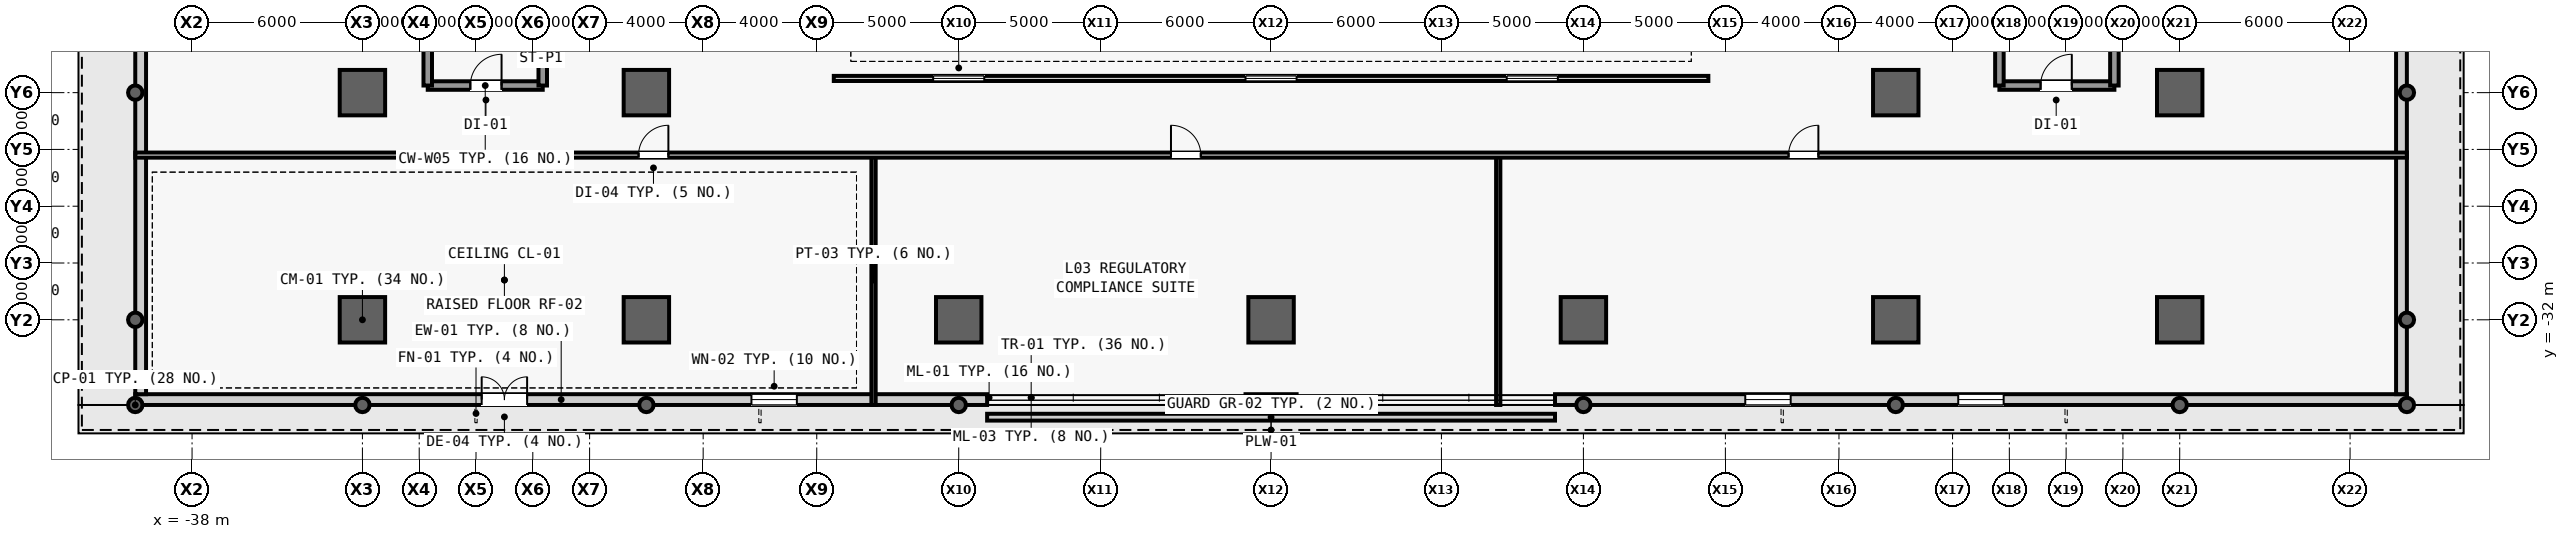
"""IFC4 building model, lengths in metres.
Left out: names, types, materials, properties, quantities, classifications, styles, units other than length and angle.
Written with IfcOpenShell. Run it as: python <this file> out.ifc"""

import sys

from ifc_helpers import new_model, si_unit, direction, frame, frame_2d, origin, origin_2d, place, context, subcontext, project, spatial, rectangle, hollow_circle, extrude, source, transform, mapped, element, fill, save


model = new_model("IFC4")
c1 = context("Model", 3, precision=1e-05, world=origin(), true_north=direction((0.0, 1.0)))
c2 = subcontext(c1, "Body", "Model", "MODEL_VIEW")
j1 = project(units=[si_unit("LENGTHUNIT", "METRE"), si_unit("PLANEANGLEUNIT", "RADIAN")], contexts=[c1])
p1 = place(None, origin())
s1 = spatial("IfcSite", under=j1, at=p1, CompositionType="ELEMENT")
p2 = place(p1, origin())
s2 = spatial("IfcBuilding", under=s1, at=p2, CompositionType="ELEMENT")
p3 = place(p2, frame((0.0, 0.0, 17.4)))
s3 = spatial("IfcBuildingStorey", under=s2, at=p3, CompositionType="ELEMENT", Elevation=17.4)
m1 = source(origin(), c2, "Body", "SweptSolid", [
    extrude(hollow_circle(Radius=0.254, WallThickness=0.025, at=origin_2d()), origin(), (0.0, 0.0, 1.0), 4.8),
])
for number, where, z_axis, x_axis in (
    (1, (-40.0, -35.0, 0.0), (0.0, 0.0, 1.0), (1.0, 0.0, 0.0)),
    (2, (-40.0, -24.0, 0.0), (0.0, 0.0, 1.0), (1.0, 0.0, 0.0)),
    (3, (-32.0, -35.0, 0.0), (0.0, 0.0, 1.0), (1.0, 0.0, 0.0)),
):
    element("IfcColumn", number, at=place(p3, frame(where, z_axis=z_axis, x_axis=x_axis)), inside=s3, PredefinedType="COLUMN", context=c2, shape_type="MappedRepresentation", body=[
        mapped(m1, transform((0.0, 0.0, 0.0), scale=1.0)),
    ])
m2 = source(origin(), c2, "Body", "SweptSolid", [
    extrude(rectangle(XDim=1.6, YDim=1.6, at=origin_2d()), origin(), (0.0, 0.0, 1.0), 4.8),
])
for number, where, z_axis, x_axis in (
    (4, (-32.0, -32.0, 0.0), (0.0, 0.0, 1.0), (1.0, 0.0, 0.0)),
    (5, (-32.0, -24.0, 0.0), (0.0, 0.0, 1.0), (1.0, 0.0, 0.0)),
):
    element("IfcColumn", number, at=place(p3, frame(where, z_axis=z_axis, x_axis=x_axis)), inside=s3, PredefinedType="COLUMN", context=c2, shape_type="MappedRepresentation", body=[
        mapped(m2, transform((0.0, 0.0, 0.0), scale=1.0)),
    ])
p4 = place(p3, frame((-22.0, -35.0, 0.0), z_axis=(0.0, 0.0, 1.0), x_axis=(1.0, 0.0, 0.0)))
e6 = element("IfcColumn", 6, at=p4, inside=s3, PredefinedType="COLUMN", context=c2, shape_type="MappedRepresentation", body=[
    mapped(m1, transform((0.0, 0.0, 0.0), scale=1.0)),
])
for number, where, z_axis, x_axis in (
    (7, (-22.0, -32.0, 0.0), (0.0, 0.0, 1.0), (1.0, 0.0, 0.0)),
    (8, (-22.0, -24.0, 0.0), (0.0, 0.0, 1.0), (1.0, 0.0, 0.0)),
):
    element("IfcColumn", number, at=place(p3, frame(where, z_axis=z_axis, x_axis=x_axis)), inside=s3, PredefinedType="COLUMN", context=c2, shape_type="MappedRepresentation", body=[
        mapped(m2, transform((0.0, 0.0, 0.0), scale=1.0)),
    ])
p5 = place(p3, frame((-11.0, -35.0, 0.0), z_axis=(0.0, 0.0, 1.0), x_axis=(1.0, 0.0, 0.0)))
e9 = element("IfcColumn", 9, at=p5, inside=s3, PredefinedType="COLUMN", context=c2, shape_type="MappedRepresentation", body=[
    mapped(m1, transform((0.0, 0.0, 0.0), scale=1.0)),
])
for number, where, z_axis, x_axis in (
    (10, (-11.0, -32.0, 0.0), (0.0, 0.0, 1.0), (1.0, 0.0, 0.0)),
    (11, (0.0, -32.0, 0.0), (0.0, 0.0, 1.0), (1.0, 0.0, 0.0)),
):
    element("IfcColumn", number, at=place(p3, frame(where, z_axis=z_axis, x_axis=x_axis)), inside=s3, PredefinedType="COLUMN", context=c2, shape_type="MappedRepresentation", body=[
        mapped(m2, transform((0.0, 0.0, 0.0), scale=1.0)),
    ])
p6 = place(p3, frame((11.0, -35.0, 0.0), z_axis=(0.0, 0.0, 1.0), x_axis=(1.0, 0.0, 0.0)))
e12 = element("IfcColumn", 12, at=p6, inside=s3, PredefinedType="COLUMN", context=c2, shape_type="MappedRepresentation", body=[
    mapped(m1, transform((0.0, 0.0, 0.0), scale=1.0)),
])
p7 = place(p3, frame((11.0, -32.0, 0.0), z_axis=(0.0, 0.0, 1.0), x_axis=(1.0, 0.0, 0.0)))
e13 = element("IfcColumn", 13, at=p7, inside=s3, PredefinedType="COLUMN", context=c2, shape_type="MappedRepresentation", body=[
    mapped(m2, transform((0.0, 0.0, 0.0), scale=1.0)),
])
p8 = place(p3, frame((22.0, -35.0, 0.0), z_axis=(0.0, 0.0, 1.0), x_axis=(1.0, 0.0, 0.0)))
e14 = element("IfcColumn", 14, at=p8, inside=s3, PredefinedType="COLUMN", context=c2, shape_type="MappedRepresentation", body=[
    mapped(m1, transform((0.0, 0.0, 0.0), scale=1.0)),
])
for number, where, z_axis, x_axis in (
    (15, (22.0, -32.0, 0.0), (0.0, 0.0, 1.0), (1.0, 0.0, 0.0)),
    (16, (22.0, -24.0, 0.0), (0.0, 0.0, 1.0), (1.0, 0.0, 0.0)),
):
    element("IfcColumn", number, at=place(p3, frame(where, z_axis=z_axis, x_axis=x_axis)), inside=s3, PredefinedType="COLUMN", context=c2, shape_type="MappedRepresentation", body=[
        mapped(m2, transform((0.0, 0.0, 0.0), scale=1.0)),
    ])
p9 = place(p3, frame((32.0, -35.0, 0.0), z_axis=(0.0, 0.0, 1.0), x_axis=(1.0, 0.0, 0.0)))
e17 = element("IfcColumn", 17, at=p9, inside=s3, PredefinedType="COLUMN", context=c2, shape_type="MappedRepresentation", body=[
    mapped(m1, transform((0.0, 0.0, 0.0), scale=1.0)),
])
for number, where, z_axis, x_axis in (
    (18, (32.0, -32.0, 0.0), (0.0, 0.0, 1.0), (1.0, 0.0, 0.0)),
    (19, (32.0, -24.0, 0.0), (0.0, 0.0, 1.0), (1.0, 0.0, 0.0)),
):
    element("IfcColumn", number, at=place(p3, frame(where, z_axis=z_axis, x_axis=x_axis)), inside=s3, PredefinedType="COLUMN", context=c2, shape_type="MappedRepresentation", body=[
        mapped(m2, transform((0.0, 0.0, 0.0), scale=1.0)),
    ])
for number, where, z_axis, x_axis in (
    (20, (40.0, -35.0, 0.0), (0.0, 0.0, 1.0), (1.0, 0.0, 0.0)),
    (21, (40.0, -24.0, 0.0), (0.0, 0.0, 1.0), (1.0, 0.0, 0.0)),
    (22, (-40.0, -32.0, 0.0), (0.0, 0.0, 1.0), (1.0, 0.0, 0.0)),
    (23, (40.0, -32.0, 0.0), (0.0, 0.0, 1.0), (1.0, 0.0, 0.0)),
):
    element("IfcColumn", number, at=place(p3, frame(where, z_axis=z_axis, x_axis=x_axis)), inside=s3, PredefinedType="COLUMN", context=c2, shape_type="MappedRepresentation", body=[
        mapped(m1, transform((0.0, 0.0, 0.0), scale=1.0)),
    ])
m3 = source(origin(), c2, "Body", "SweptSolid", [
    extrude(rectangle(XDim=30.0, YDim=0.38, at=frame_2d((15.0, 0.0))), origin(), (0.0, 0.0, 1.0), 2.68),
])
p10 = place(p3, frame((-40.0, -34.81, 0.0), z_axis=(0.0, 0.0, 1.0), x_axis=(1.0, 0.0, 0.0)))
e24 = element("IfcWall", 24, at=p10, inside=s3, PredefinedType="STANDARD", context=c2, shape_type="MappedRepresentation", body=[
    mapped(m3, transform((0.0, 0.0, 0.0), scale=1.0)),
])
m4 = source(origin(), c2, "Body", "SweptSolid", [
    extrude(rectangle(XDim=1.6, YDim=2.25, at=frame_2d((0.8, 1.125))), frame((0.0, 0.2, 0.0), z_axis=(0.0, -1.0, 0.0), x_axis=(1.0, 0.0, 0.0)), (0.0, 0.0, 1.0), 0.4),
])
p11 = place(p10, frame((12.2, 0.0, 0.0)))
e25 = element("IfcOpeningElement", 25, at=p11, cuts=e24, PredefinedType="OPENING", context=c2, shape_type="MappedRepresentation", body=[
    mapped(m4, transform((0.0, 0.0, 0.0), scale=1.0)),
])
m5 = source(origin(), c2, "Body", "SweptSolid", [
    extrude(rectangle(XDim=1.6, YDim=1.96, at=frame_2d((0.8, 0.98))), frame((0.0, 0.2, 0.0), z_axis=(0.0, -1.0, 0.0), x_axis=(1.0, 0.0, 0.0)), (0.0, 0.0, 1.0), 0.4),
])
p12 = place(p10, frame((21.7, 0.0, 0.5)))
e26 = element("IfcOpeningElement", 26, at=p12, cuts=e24, PredefinedType="OPENING", context=c2, shape_type="MappedRepresentation", body=[
    mapped(m5, transform((0.0, 0.0, 0.0), scale=1.0)),
])
m6 = source(origin(), c2, "Body", "SweptSolid", [
    extrude(rectangle(XDim=1.8, YDim=0.38, at=frame_2d((0.9, 0.0))), origin(), (0.0, 0.0, 1.0), 2.68),
])
p13 = place(p3, frame((-0.9, -34.81, 0.0), z_axis=(0.0, 0.0, 1.0), x_axis=(1.0, 0.0, 0.0)))
e27 = element("IfcWall", 27, at=p13, inside=s3, PredefinedType="STANDARD", context=c2, shape_type="MappedRepresentation", body=[
    mapped(m6, transform((0.0, 0.0, 0.0), scale=1.0)),
])
p14 = place(p3, frame((10.0, -34.81, 0.0), z_axis=(0.0, 0.0, 1.0), x_axis=(1.0, 0.0, 0.0)))
e28 = element("IfcWall", 28, at=p14, inside=s3, PredefinedType="STANDARD", context=c2, shape_type="MappedRepresentation", body=[
    mapped(m3, transform((0.0, 0.0, 0.0), scale=1.0)),
])
p15 = place(p14, frame((6.7, 0.0, 0.5)))
e29 = element("IfcOpeningElement", 29, at=p15, cuts=e28, PredefinedType="OPENING", context=c2, shape_type="MappedRepresentation", body=[
    mapped(m5, transform((0.0, 0.0, 0.0), scale=1.0)),
])
p16 = place(p14, frame((14.2, 0.0, 0.5)))
e30 = element("IfcOpeningElement", 30, at=p16, cuts=e28, PredefinedType="OPENING", context=c2, shape_type="MappedRepresentation", body=[
    mapped(m5, transform((0.0, 0.0, 0.0), scale=1.0)),
])
m7 = source(origin(), c2, "Body", "SweptSolid", [
    extrude(rectangle(XDim=69.24, YDim=0.38, at=frame_2d((34.62, 0.0))), origin(), (0.0, 0.0, 1.0), 2.68),
])
p17 = place(p3, frame((-39.81, -34.62, 0.0), z_axis=(0.0, 0.0, 1.0), x_axis=(0.0, 1.0, 0.0)))
e31 = element("IfcWall", 31, at=p17, inside=s3, PredefinedType="STANDARD", context=c2, shape_type="MappedRepresentation", body=[
    mapped(m7, transform((0.0, 0.0, 0.0), scale=1.0)),
])
p18 = place(p17, frame((39.82, 0.0, 0.0)))
e32 = element("IfcOpeningElement", 32, at=p18, cuts=e31, PredefinedType="OPENING", context=c2, shape_type="MappedRepresentation", body=[
    mapped(m4, transform((0.0, 0.0, 0.0), scale=1.0)),
])
p19 = place(p17, frame((16.51, 0.0, 0.5)))
e33 = element("IfcOpeningElement", 33, at=p19, cuts=e31, PredefinedType="OPENING", context=c2, shape_type="MappedRepresentation", body=[
    mapped(m5, transform((0.0, 0.0, 0.0), scale=1.0)),
])
p20 = place(p17, frame((51.13, 0.0, 0.5)))
e34 = element("IfcOpeningElement", 34, at=p20, cuts=e31, PredefinedType="OPENING", context=c2, shape_type="MappedRepresentation", body=[
    mapped(m5, transform((0.0, 0.0, 0.0), scale=1.0)),
])
p21 = place(p3, frame((39.81, -34.62, 0.0), z_axis=(0.0, 0.0, 1.0), x_axis=(0.0, 1.0, 0.0)))
e35 = element("IfcWall", 35, at=p21, inside=s3, PredefinedType="STANDARD", context=c2, shape_type="MappedRepresentation", body=[
    mapped(m7, transform((0.0, 0.0, 0.0), scale=1.0)),
])
p22 = place(p21, frame((39.82, 0.0, 0.0)))
e36 = element("IfcOpeningElement", 36, at=p22, cuts=e35, PredefinedType="OPENING", context=c2, shape_type="MappedRepresentation", body=[
    mapped(m4, transform((0.0, 0.0, 0.0), scale=1.0)),
])
p23 = place(p21, frame((16.51, 0.0, 0.5)))
e37 = element("IfcOpeningElement", 37, at=p23, cuts=e35, PredefinedType="OPENING", context=c2, shape_type="MappedRepresentation", body=[
    mapped(m5, transform((0.0, 0.0, 0.0), scale=1.0)),
])
p24 = place(p21, frame((51.13, 0.0, 0.5)))
e38 = element("IfcOpeningElement", 38, at=p24, cuts=e35, PredefinedType="OPENING", context=c2, shape_type="MappedRepresentation", body=[
    mapped(m5, transform((0.0, 0.0, 0.0), scale=1.0)),
])
m8 = source(origin(), c2, "Body", "SweptSolid", [
    extrude(rectangle(XDim=20.0, YDim=0.24, at=frame_2d((10.0, 0.0))), origin(), (0.0, 0.0, 1.0), 0.65),
])
p25 = place(p3, frame((-10.0, -35.43, 0.0), z_axis=(0.0, 0.0, 1.0), x_axis=(1.0, 0.0, 0.0)))
e39 = element("IfcWall", 39, at=p25, inside=s3, PredefinedType="STANDARD", context=c2, shape_type="MappedRepresentation", body=[
    mapped(m8, transform((0.0, 0.0, 0.0), scale=1.0)),
])
m9 = source(origin(), c2, "Body", "SweptSolid", [
    extrude(rectangle(XDim=4.05, YDim=0.3, at=frame_2d((2.025, 0.0))), origin(), (0.0, 0.0, 1.0), 4.48),
])
p26 = place(p3, frame((-29.7, -23.75, 0.0), z_axis=(0.0, 0.0, 1.0), x_axis=(1.0, 0.0, 0.0)))
e40 = element("IfcWall", 40, at=p26, inside=s3, PredefinedType="SHEAR", context=c2, shape_type="MappedRepresentation", body=[
    mapped(m9, transform((0.0, 0.0, 0.0), scale=1.0)),
])
m10 = source(origin(), c2, "Body", "SweptSolid", [
    extrude(rectangle(XDim=1.1, YDim=2.2, at=frame_2d((0.55, 1.1))), frame((0.0, 0.16, 0.0), z_axis=(0.0, -1.0, 0.0), x_axis=(1.0, 0.0, 0.0)), (0.0, 0.0, 1.0), 0.32),
])
p27 = place(p26, frame((1.5, 0.0, 0.0)))
e41 = element("IfcOpeningElement", 41, at=p27, cuts=e40, PredefinedType="OPENING", context=c2, shape_type="MappedRepresentation", body=[
    mapped(m10, transform((0.0, 0.0, 0.0), scale=1.0)),
])
m11 = source(origin(), c2, "Body", "SweptSolid", [
    extrude(rectangle(XDim=10.5, YDim=0.3, at=frame_2d((5.25, 0.0))), origin(), (0.0, 0.0, 1.0), 4.48),
])
for number, where, z_axis, x_axis in (
    (42, (-29.7, -23.75, 0.0), (0.0, 0.0, 1.0), (0.0, 1.0, 0.0)),
    (43, (-25.65, -23.75, 0.0), (0.0, 0.0, 1.0), (0.0, 1.0, 0.0)),
):
    element("IfcWall", number, at=place(p3, frame(where, z_axis=z_axis, x_axis=x_axis)), inside=s3, PredefinedType="SHEAR", context=c2, shape_type="MappedRepresentation", body=[
        mapped(m11, transform((0.0, 0.0, 0.0), scale=1.0)),
    ])
p28 = place(p3, frame((25.65, -23.75, 0.0), z_axis=(0.0, 0.0, 1.0), x_axis=(1.0, 0.0, 0.0)))
e44 = element("IfcWall", 44, at=p28, inside=s3, PredefinedType="SHEAR", context=c2, shape_type="MappedRepresentation", body=[
    mapped(m9, transform((0.0, 0.0, 0.0), scale=1.0)),
])
p29 = place(p28, frame((1.45, 0.0, 0.0)))
e45 = element("IfcOpeningElement", 45, at=p29, cuts=e44, PredefinedType="OPENING", context=c2, shape_type="MappedRepresentation", body=[
    mapped(m10, transform((0.0, 0.0, 0.0), scale=1.0)),
])
for number, where, z_axis, x_axis in (
    (46, (25.65, -23.75, 0.0), (0.0, 0.0, 1.0), (0.0, 1.0, 0.0)),
    (47, (29.7, -23.75, 0.0), (0.0, 0.0, 1.0), (0.0, 1.0, 0.0)),
):
    element("IfcWall", number, at=place(p3, frame(where, z_axis=z_axis, x_axis=x_axis)), inside=s3, PredefinedType="SHEAR", context=c2, shape_type="MappedRepresentation", body=[
        mapped(m11, transform((0.0, 0.0, 0.0), scale=1.0)),
    ])
m12 = source(origin(), c2, "Body", "SweptSolid", [
    extrude(rectangle(XDim=30.8, YDim=0.18, at=frame_2d((15.4, 0.0))), origin(), (0.0, 0.0, 1.0), 4.48),
])
p30 = place(p3, frame((-15.4, -23.5, 0.0), z_axis=(0.0, 0.0, 1.0), x_axis=(1.0, 0.0, 0.0)))
e48 = element("IfcWall", 48, at=p30, inside=s3, PredefinedType="PARTITIONING", context=c2, shape_type="MappedRepresentation", body=[
    mapped(m12, transform((0.0, 0.0, 0.0), scale=1.0)),
])
m13 = source(origin(), c2, "Body", "SweptSolid", [
    extrude(rectangle(XDim=1.8, YDim=1.4, at=frame_2d((0.9, 0.7))), frame((0.0, 0.1, 0.0), z_axis=(0.0, -1.0, 0.0), x_axis=(1.0, 0.0, 0.0)), (0.0, 0.0, 1.0), 0.2),
])
p31 = place(p30, frame((3.5, 0.0, 0.9)))
e49 = element("IfcOpeningElement", 49, at=p31, cuts=e48, PredefinedType="OPENING", context=c2, shape_type="MappedRepresentation", body=[
    mapped(m13, transform((0.0, 0.0, 0.0), scale=1.0)),
])
p32 = place(p30, frame((14.5, 0.0, 0.9)))
e50 = element("IfcOpeningElement", 50, at=p32, cuts=e48, PredefinedType="OPENING", context=c2, shape_type="MappedRepresentation", body=[
    mapped(m13, transform((0.0, 0.0, 0.0), scale=1.0)),
])
p33 = place(p30, frame((23.7, 0.0, 0.9)))
e51 = element("IfcOpeningElement", 51, at=p33, cuts=e48, PredefinedType="OPENING", context=c2, shape_type="MappedRepresentation", body=[
    mapped(m13, transform((0.0, 0.0, 0.0), scale=1.0)),
])
m14 = source(origin(), c2, "Body", "SweptSolid", [
    extrude(rectangle(XDim=8.8, YDim=0.15, at=frame_2d((4.4, 0.0))), origin(), (0.0, 0.0, 1.0), 4.48),
])
for number, where, z_axis, x_axis in (
    (52, (-14.0, -35.0, 0.0), (0.0, 0.0, 1.0), (0.0, 1.0, 0.0)),
    (53, (8.0, -35.0, 0.0), (0.0, 0.0, 1.0), (0.0, 1.0, 0.0)),
):
    element("IfcWall", number, at=place(p3, frame(where, z_axis=z_axis, x_axis=x_axis)), inside=s3, PredefinedType="PARTITIONING", context=c2, shape_type="MappedRepresentation", body=[
        mapped(m14, transform((0.0, 0.0, 0.0), scale=1.0)),
    ])
m15 = source(origin(), c2, "Body", "SweptSolid", [
    extrude(rectangle(XDim=80.0, YDim=0.18, at=frame_2d((40.0, 0.0))), origin(), (0.0, 0.0, 1.0), 4.48),
])
p34 = place(p3, frame((-40.0, -26.2, 0.0), z_axis=(0.0, 0.0, 1.0), x_axis=(1.0, 0.0, 0.0)))
e54 = element("IfcWall", 54, at=p34, inside=s3, PredefinedType="PARTITIONING", context=c2, shape_type="MappedRepresentation", body=[
    mapped(m15, transform((0.0, 0.0, 0.0), scale=1.0)),
])
m16 = source(origin(), c2, "Body", "SweptSolid", [
    extrude(rectangle(XDim=1.05, YDim=2.2, at=frame_2d((0.525, 1.1))), frame((0.0, 0.1, 0.0), z_axis=(0.0, -1.0, 0.0), x_axis=(1.0, 0.0, 0.0)), (0.0, 0.0, 1.0), 0.2),
])
p35 = place(p34, frame((17.725, 0.0, 0.0)))
e55 = element("IfcOpeningElement", 55, at=p35, cuts=e54, PredefinedType="OPENING", context=c2, shape_type="MappedRepresentation", body=[
    mapped(m16, transform((0.0, 0.0, 0.0), scale=1.0)),
])
p36 = place(p34, frame((36.475, 0.0, 0.0)))
e56 = element("IfcOpeningElement", 56, at=p36, cuts=e54, PredefinedType="OPENING", context=c2, shape_type="MappedRepresentation", body=[
    mapped(m16, transform((0.0, 0.0, 0.0), scale=1.0)),
])
p37 = place(p34, frame((58.225, 0.0, 0.0)))
e57 = element("IfcOpeningElement", 57, at=p37, cuts=e54, PredefinedType="OPENING", context=c2, shape_type="MappedRepresentation", body=[
    mapped(m16, transform((0.0, 0.0, 0.0), scale=1.0)),
])
m17 = source(origin(), c2, "Body", "SweptSolid", [
    extrude(rectangle(XDim=1.6, YDim=2.25, at=frame_2d((0.8, 1.125))), frame((0.0, 0.025, 0.0), z_axis=(0.0, -1.0, 0.0), x_axis=(1.0, 0.0, 0.0)), (0.0, 0.0, 1.0), 0.05),
])
p38 = place(p11, origin())
e58 = element("IfcDoor", 58, at=p38, inside=s3, OperationType="DOUBLE_DOOR_SINGLE_SWING", PredefinedType="DOOR", context=c2, shape_type="MappedRepresentation", body=[
    mapped(m17, transform((0.0, 0.0, 0.0), scale=1.0)),
])
fill(e25, e58)
m18 = source(origin(), c2, "Body", "SweptSolid", [
    extrude(rectangle(XDim=1.6, YDim=1.96, at=frame_2d((0.8, 0.98))), frame((0.0, 0.03, 0.0), z_axis=(0.0, -1.0, 0.0), x_axis=(1.0, 0.0, 0.0)), (0.0, 0.0, 1.0), 0.06),
])
p39 = place(p12, origin())
e59 = element("IfcWindow", 59, at=p39, inside=s3, PartitioningType="SINGLE_PANEL", PredefinedType="WINDOW", context=c2, shape_type="MappedRepresentation", body=[
    mapped(m18, transform((0.0, 0.0, 0.0), scale=1.0)),
])
fill(e26, e59)
p40 = place(p15, origin())
e60 = element("IfcWindow", 60, at=p40, inside=s3, PartitioningType="SINGLE_PANEL", PredefinedType="WINDOW", context=c2, shape_type="MappedRepresentation", body=[
    mapped(m18, transform((0.0, 0.0, 0.0), scale=1.0)),
])
fill(e29, e60)
p41 = place(p16, origin())
e61 = element("IfcWindow", 61, at=p41, inside=s3, PartitioningType="SINGLE_PANEL", PredefinedType="WINDOW", context=c2, shape_type="MappedRepresentation", body=[
    mapped(m18, transform((0.0, 0.0, 0.0), scale=1.0)),
])
fill(e30, e61)
m19 = source(origin(), c2, "Body", "SweptSolid", [
    extrude(rectangle(XDim=1.1, YDim=2.2, at=frame_2d((0.55, 1.1))), frame((0.0, 0.025, 0.0), z_axis=(0.0, -1.0, 0.0), x_axis=(1.0, 0.0, 0.0)), (0.0, 0.0, 1.0), 0.05),
])
p42 = place(p27, origin())
e62 = element("IfcDoor", 62, at=p42, inside=s3, OperationType="SINGLE_SWING_RIGHT", PredefinedType="DOOR", context=c2, shape_type="MappedRepresentation", body=[
    mapped(m19, transform((0.0, 0.0, 0.0), scale=1.0)),
])
fill(e41, e62)
p43 = place(p29, origin())
e63 = element("IfcDoor", 63, at=p43, inside=s3, OperationType="SINGLE_SWING_RIGHT", PredefinedType="DOOR", context=c2, shape_type="MappedRepresentation", body=[
    mapped(m19, transform((0.0, 0.0, 0.0), scale=1.0)),
])
fill(e45, e63)
m20 = source(origin(), c2, "Body", "SweptSolid", [
    extrude(rectangle(XDim=1.05, YDim=2.2, at=frame_2d((0.525, 1.1))), frame((0.0, 0.025, 0.0), z_axis=(0.0, -1.0, 0.0), x_axis=(1.0, 0.0, 0.0)), (0.0, 0.0, 1.0), 0.05),
])
p44 = place(p35, origin())
e64 = element("IfcDoor", 64, at=p44, inside=s3, OperationType="SINGLE_SWING_RIGHT", PredefinedType="DOOR", context=c2, shape_type="MappedRepresentation", body=[
    mapped(m20, transform((0.0, 0.0, 0.0), scale=1.0)),
])
fill(e55, e64)
p45 = place(p36, origin())
e65 = element("IfcDoor", 65, at=p45, inside=s3, OperationType="SINGLE_SWING_LEFT", PredefinedType="DOOR", context=c2, shape_type="MappedRepresentation", body=[
    mapped(m20, transform((0.0, 0.0, 0.0), scale=1.0)),
])
fill(e56, e65)
p46 = place(p37, origin())
e66 = element("IfcDoor", 66, at=p46, inside=s3, OperationType="SINGLE_SWING_RIGHT", PredefinedType="DOOR", context=c2, shape_type="MappedRepresentation", body=[
    mapped(m20, transform((0.0, 0.0, 0.0), scale=1.0)),
])
fill(e57, e66)
m21 = source(origin(), c2, "Body", "SweptSolid", [
    extrude(rectangle(XDim=1.8, YDim=1.4, at=frame_2d((0.9, 0.7))), frame((0.0, 0.03, 0.0), z_axis=(0.0, -1.0, 0.0), x_axis=(1.0, 0.0, 0.0)), (0.0, 0.0, 1.0), 0.06),
])
p47 = place(p31, origin())
e67 = element("IfcWindow", 67, at=p47, inside=s3, PartitioningType="SINGLE_PANEL", PredefinedType="WINDOW", context=c2, shape_type="MappedRepresentation", body=[
    mapped(m21, transform((0.0, 0.0, 0.0), scale=1.0)),
])
fill(e49, e67)
p48 = place(p32, origin())
e68 = element("IfcWindow", 68, at=p48, inside=s3, PartitioningType="SINGLE_PANEL", PredefinedType="WINDOW", context=c2, shape_type="MappedRepresentation", body=[
    mapped(m21, transform((0.0, 0.0, 0.0), scale=1.0)),
])
fill(e50, e68)
p49 = place(p33, origin())
e69 = element("IfcWindow", 69, at=p49, inside=s3, PartitioningType="SINGLE_PANEL", PredefinedType="WINDOW", context=c2, shape_type="MappedRepresentation", body=[
    mapped(m21, transform((0.0, 0.0, 0.0), scale=1.0)),
])
fill(e51, e69)
save(model, sys.argv[1])
